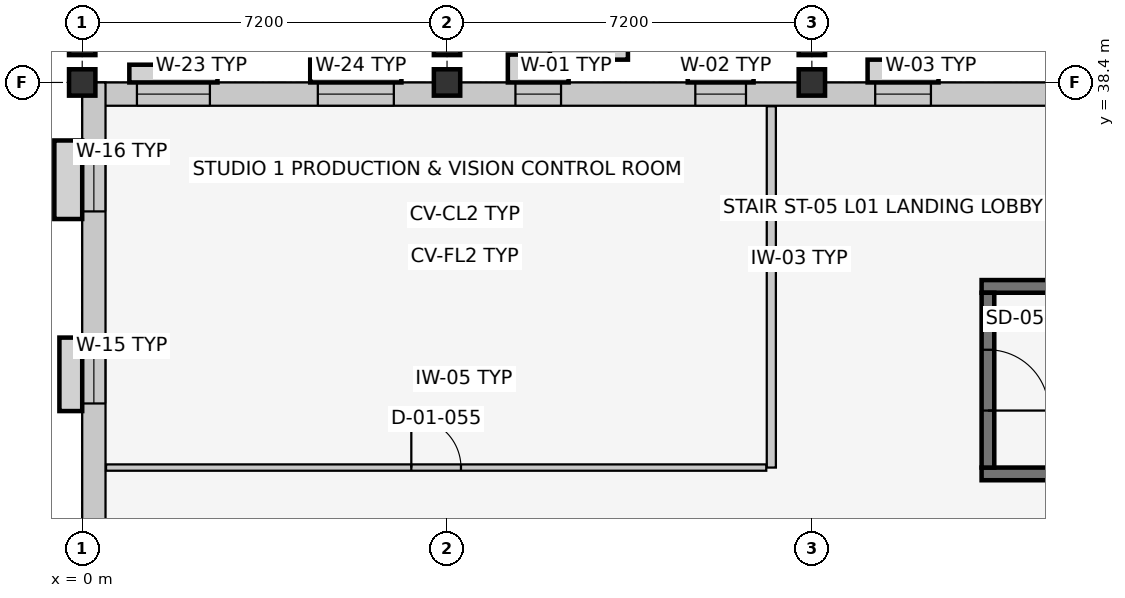
"""IFC4 building model, lengths in metres.
Left out: names, types, materials, properties, quantities, classifications, styles, units other than length and angle.
Written with IfcOpenShell. Run it as: python <this file> out.ifc"""

import sys

from ifc_helpers import new_model, si_unit, direction, frame, frame_2d, origin, origin_2d, place, context, subcontext, project, spatial, rectangle, extrude, element, fill, save


model = new_model("IFC4")
c1 = context("Model", 3, precision=1e-05, world=origin(), true_north=direction((0.0, 1.0)))
c2 = subcontext(c1, "Body", "Model", "MODEL_VIEW")
j1 = project(units=[si_unit("LENGTHUNIT", "METRE"), si_unit("PLANEANGLEUNIT", "RADIAN")], contexts=[c1])
p1 = place(None, origin())
s1 = spatial("IfcSite", under=j1, at=p1, CompositionType="ELEMENT")
p2 = place(p1, origin())
s2 = spatial("IfcBuilding", under=s1, at=p2, CompositionType="ELEMENT")
p3 = place(p2, frame((0.0, 0.0, 5.4)))
s3 = spatial("IfcBuildingStorey", under=s2, at=p3, CompositionType="ELEMENT", Elevation=5.4)
for number, where, z_axis, x_axis in (
    (1, (0.0, 38.4, 0.0), (0.0, 0.0, 1.0), (1.0, 0.0, 0.0)),
    (2, (7.2, 38.4, 0.0), (0.0, 0.0, 1.0), (1.0, 0.0, 0.0)),
    (3, (14.4, 38.4, 0.0), (0.0, 0.0, 1.0), (1.0, 0.0, 0.0)),
    (4, (0.0, 39.2, 0.0), (0.0, 0.0, 1.0), (1.0, 0.0, 0.0)),
    (5, (7.2, 39.2, 0.0), (0.0, 0.0, 1.0), (1.0, 0.0, 0.0)),
    (6, (14.4, 39.2, 0.0), (0.0, 0.0, 1.0), (1.0, 0.0, 0.0)),
):
    element("IfcColumn", number, at=place(p3, frame(where, z_axis=z_axis, x_axis=x_axis)), inside=s3, PredefinedType="COLUMN", context=c2, shape_type="SweptSolid", body=[
        extrude(rectangle(XDim=0.52, YDim=0.52, at=origin_2d()), origin(), (0.0, 0.0, 1.0), 4.2),
    ])
p4 = place(p3, frame((0.0, 38.17, 0.0), z_axis=(0.0, 0.0, 1.0), x_axis=(1.0, 0.0, 0.0)))
e7 = element("IfcWall", 7, at=p4, inside=s3, PredefinedType="SOLIDWALL", context=c2, shape_type="SweptSolid", body=[
    extrude(rectangle(XDim=57.6, YDim=0.46, at=frame_2d((28.8, 0.0))), origin(), (0.0, 0.0, 1.0), 3.215),
])
p5 = place(p4, frame((1.08, 0.0, 0.9)))
e8 = element("IfcOpeningElement", 8, at=p5, cuts=e7, PredefinedType="OPENING", context=c2, shape_type="SweptSolid", body=[
    extrude(rectangle(XDim=1.44, YDim=1.75, at=frame_2d((0.72, 0.875))), frame((0.0, 0.242, 0.0), z_axis=(0.0, -1.0, 0.0), x_axis=(1.0, 0.0, 0.0)), (0.0, 0.0, 1.0), 0.484),
])
p6 = place(p4, frame((4.65, 0.0, 0.9)))
e9 = element("IfcOpeningElement", 9, at=p6, cuts=e7, PredefinedType="OPENING", context=c2, shape_type="SweptSolid", body=[
    extrude(rectangle(XDim=1.5, YDim=1.75, at=frame_2d((0.75, 0.875))), frame((0.0, 0.242, 0.0), z_axis=(0.0, -1.0, 0.0), x_axis=(1.0, 0.0, 0.0)), (0.0, 0.0, 1.0), 0.484),
])
p7 = place(p4, frame((8.55, 0.0, 0.9)))
e10 = element("IfcOpeningElement", 10, at=p7, cuts=e7, PredefinedType="OPENING", context=c2, shape_type="SweptSolid", body=[
    extrude(rectangle(XDim=0.9, YDim=1.35, at=frame_2d((0.45, 0.675))), frame((0.0, 0.242, 0.0), z_axis=(0.0, -1.0, 0.0), x_axis=(1.0, 0.0, 0.0)), (0.0, 0.0, 1.0), 0.484),
])
p8 = place(p4, frame((12.1, 0.0, 0.9)))
e11 = element("IfcOpeningElement", 11, at=p8, cuts=e7, PredefinedType="OPENING", context=c2, shape_type="SweptSolid", body=[
    extrude(rectangle(XDim=1.0, YDim=1.35, at=frame_2d((0.5, 0.675))), frame((0.0, 0.242, 0.0), z_axis=(0.0, -1.0, 0.0), x_axis=(1.0, 0.0, 0.0)), (0.0, 0.0, 1.0), 0.484),
])
p9 = place(p4, frame((15.65, 0.0, 0.9)))
e12 = element("IfcOpeningElement", 12, at=p9, cuts=e7, PredefinedType="OPENING", context=c2, shape_type="SweptSolid", body=[
    extrude(rectangle(XDim=1.1, YDim=1.35, at=frame_2d((0.55, 0.675))), frame((0.0, 0.242, 0.0), z_axis=(0.0, -1.0, 0.0), x_axis=(1.0, 0.0, 0.0)), (0.0, 0.0, 1.0), 0.484),
])
p10 = place(p4, frame((19.2, 0.0, 0.9)))
e13 = element("IfcOpeningElement", 13, at=p10, cuts=e7, PredefinedType="OPENING", context=c2, shape_type="SweptSolid", body=[
    extrude(rectangle(XDim=1.2, YDim=1.35, at=frame_2d((0.6, 0.675))), frame((0.0, 0.242, 0.0), z_axis=(0.0, -1.0, 0.0), x_axis=(1.0, 0.0, 0.0)), (0.0, 0.0, 1.0), 0.484),
])
p11 = place(p4, frame((22.75, 0.0, 0.9)))
e14 = element("IfcOpeningElement", 14, at=p11, cuts=e7, PredefinedType="OPENING", context=c2, shape_type="SweptSolid", body=[
    extrude(rectangle(XDim=1.3, YDim=1.35, at=frame_2d((0.65, 0.675))), frame((0.0, 0.242, 0.0), z_axis=(0.0, -1.0, 0.0), x_axis=(1.0, 0.0, 0.0)), (0.0, 0.0, 1.0), 0.484),
])
p12 = place(p4, frame((30.125, 0.0, 0.9)))
e15 = element("IfcOpeningElement", 15, at=p12, cuts=e7, PredefinedType="OPENING", context=c2, shape_type="SweptSolid", body=[
    extrude(rectangle(XDim=0.95, YDim=1.45, at=frame_2d((0.475, 0.725))), frame((0.0, 0.242, 0.0), z_axis=(0.0, -1.0, 0.0), x_axis=(1.0, 0.0, 0.0)), (0.0, 0.0, 1.0), 0.484),
])
p13 = place(p4, frame((33.675, 0.0, 0.9)))
e16 = element("IfcOpeningElement", 16, at=p13, cuts=e7, PredefinedType="OPENING", context=c2, shape_type="SweptSolid", body=[
    extrude(rectangle(XDim=1.05, YDim=1.45, at=frame_2d((0.525, 0.725))), frame((0.0, 0.242, 0.0), z_axis=(0.0, -1.0, 0.0), x_axis=(1.0, 0.0, 0.0)), (0.0, 0.0, 1.0), 0.484),
])
p14 = place(p4, frame((40.775, 0.0, 0.9)))
e17 = element("IfcOpeningElement", 17, at=p14, cuts=e7, PredefinedType="OPENING", context=c2, shape_type="SweptSolid", body=[
    extrude(rectangle(XDim=1.25, YDim=1.45, at=frame_2d((0.625, 0.725))), frame((0.0, 0.242, 0.0), z_axis=(0.0, -1.0, 0.0), x_axis=(1.0, 0.0, 0.0)), (0.0, 0.0, 1.0), 0.484),
])
p15 = place(p4, frame((44.325, 0.0, 0.9)))
e18 = element("IfcOpeningElement", 18, at=p15, cuts=e7, PredefinedType="OPENING", context=c2, shape_type="SweptSolid", body=[
    extrude(rectangle(XDim=1.35, YDim=1.45, at=frame_2d((0.675, 0.725))), frame((0.0, 0.242, 0.0), z_axis=(0.0, -1.0, 0.0), x_axis=(1.0, 0.0, 0.0)), (0.0, 0.0, 1.0), 0.484),
])
p16 = place(p4, frame((51.75, 0.0, 0.9)))
e19 = element("IfcOpeningElement", 19, at=p16, cuts=e7, PredefinedType="OPENING", context=c2, shape_type="SweptSolid", body=[
    extrude(rectangle(XDim=0.9, YDim=1.6, at=frame_2d((0.45, 0.8))), frame((0.0, 0.242, 0.0), z_axis=(0.0, -1.0, 0.0), x_axis=(1.0, 0.0, 0.0)), (0.0, 0.0, 1.0), 0.484),
])
p17 = place(p4, frame((55.275, 0.0, 0.9)))
e20 = element("IfcOpeningElement", 20, at=p17, cuts=e7, PredefinedType="OPENING", context=c2, shape_type="SweptSolid", body=[
    extrude(rectangle(XDim=1.05, YDim=1.6, at=frame_2d((0.525, 0.8))), frame((0.0, 0.242, 0.0), z_axis=(0.0, -1.0, 0.0), x_axis=(1.0, 0.0, 0.0)), (0.0, 0.0, 1.0), 0.484),
])
p18 = place(p3, frame((0.23, 0.0, 0.0), z_axis=(0.0, 0.0, 1.0), x_axis=(0.0, 1.0, 0.0)))
e21 = element("IfcWall", 21, at=p18, inside=s3, PredefinedType="SOLIDWALL", context=c2, shape_type="SweptSolid", body=[
    extrude(rectangle(XDim=38.4, YDim=0.46, at=frame_2d((19.2, 0.0))), origin(), (0.0, 0.0, 1.0), 3.075),
])
p19 = place(p18, frame((32.065, 0.0, 0.9)))
e22 = element("IfcOpeningElement", 22, at=p19, cuts=e21, PredefinedType="OPENING", context=c2, shape_type="SweptSolid", body=[
    extrude(rectangle(XDim=1.15, YDim=1.6, at=frame_2d((0.575, 0.8))), frame((0.0, 0.242, 0.0), z_axis=(0.0, -1.0, 0.0), x_axis=(1.0, 0.0, 0.0)), (0.0, 0.0, 1.0), 0.484),
])
p20 = place(p18, frame((35.855, 0.0, 0.9)))
e23 = element("IfcOpeningElement", 23, at=p20, cuts=e21, PredefinedType="OPENING", context=c2, shape_type="SweptSolid", body=[
    extrude(rectangle(XDim=1.25, YDim=1.6, at=frame_2d((0.625, 0.8))), frame((0.0, 0.242, 0.0), z_axis=(0.0, -1.0, 0.0), x_axis=(1.0, 0.0, 0.0)), (0.0, 0.0, 1.0), 0.484),
])
for number, where, z_axis, x_axis in (
    (24, (17.75, 30.675, 0.0), (0.0, 0.0, 1.0), (1.0, 0.0, 0.0)),
    (25, (26.65, 34.375, 0.0), (0.0, 0.0, 1.0), (-1.0, 0.0, 0.0)),
):
    element("IfcWall", number, at=place(p3, frame(where, z_axis=z_axis, x_axis=x_axis)), inside=s3, PredefinedType="SHEAR", context=c2, shape_type="SweptSolid", body=[
        extrude(rectangle(XDim=8.9, YDim=0.25, at=frame_2d((4.45, 0.0))), origin(), (0.0, 0.0, 1.0), 3.92),
    ])
p21 = place(p3, frame((17.875, 34.25, 0.0), z_axis=(0.0, 0.0, 1.0), x_axis=(0.0, -1.0, 0.0)))
e26 = element("IfcWall", 26, at=p21, inside=s3, PredefinedType="SHEAR", context=c2, shape_type="SweptSolid", body=[
    extrude(rectangle(XDim=3.45, YDim=0.25, at=frame_2d((1.725, 0.0))), origin(), (0.0, 0.0, 1.0), 3.92),
])
p22 = place(p21, frame((1.125, 0.0, 0.0)))
e27 = element("IfcOpeningElement", 27, at=p22, cuts=e26, PredefinedType="OPENING", context=c2, shape_type="SweptSolid", body=[
    extrude(rectangle(XDim=1.2, YDim=2.15, at=frame_2d((0.6, 1.075))), frame((0.0, 0.137, 0.0), z_axis=(0.0, -1.0, 0.0), x_axis=(1.0, 0.0, 0.0)), (0.0, 0.0, 1.0), 0.274),
])
p23 = place(p3, frame((13.6, 30.8, 0.0), z_axis=(0.0, 0.0, 1.0), x_axis=(0.0, 1.0, 0.0)))
e28 = element("IfcWall", 28, at=p23, inside=s3, PredefinedType="PARTITIONING", context=c2, shape_type="SweptSolid", body=[
    extrude(rectangle(XDim=7.13, YDim=0.18, at=frame_2d((3.565, 0.0))), origin(), (0.0, 0.0, 1.0), 3.92),
])
p24 = place(p3, frame((0.47, 30.8, 0.0), z_axis=(0.0, 0.0, 1.0), x_axis=(1.0, 0.0, 0.0)))
e29 = element("IfcWall", 29, at=p24, inside=s3, PredefinedType="PARTITIONING", context=c2, shape_type="SweptSolid", body=[
    extrude(rectangle(XDim=13.03, YDim=0.125, at=frame_2d((6.515, 0.0))), origin(), (0.0, 0.0, 1.0), 3.92),
])
p25 = place(p24, frame((6.025, 0.0, 0.0)))
e30 = element("IfcOpeningElement", 30, at=p25, cuts=e29, PredefinedType="OPENING", context=c2, shape_type="SweptSolid", body=[
    extrude(rectangle(XDim=0.98, YDim=2.12, at=frame_2d((0.49, 1.06))), frame((0.0, 0.074, 0.0), z_axis=(0.0, -1.0, 0.0), x_axis=(1.0, 0.0, 0.0)), (0.0, 0.0, 1.0), 0.149),
])
p26 = place(p5, origin())
e31 = element("IfcWindow", 31, at=p26, inside=s3, PartitioningType="SINGLE_PANEL", PredefinedType="WINDOW", context=c2, shape_type="SweptSolid", body=[
    extrude(rectangle(XDim=1.44, YDim=1.75, at=frame_2d((0.72, 0.875))), frame((0.0, 0.03, 0.0), z_axis=(0.0, -1.0, 0.0), x_axis=(1.0, 0.0, 0.0)), (0.0, 0.0, 1.0), 0.06),
])
fill(e8, e31)
p27 = place(p6, origin())
e32 = element("IfcWindow", 32, at=p27, inside=s3, PartitioningType="SINGLE_PANEL", PredefinedType="WINDOW", context=c2, shape_type="SweptSolid", body=[
    extrude(rectangle(XDim=1.5, YDim=1.75, at=frame_2d((0.75, 0.875))), frame((0.0, 0.03, 0.0), z_axis=(0.0, -1.0, 0.0), x_axis=(1.0, 0.0, 0.0)), (0.0, 0.0, 1.0), 0.06),
])
fill(e9, e32)
p28 = place(p7, origin())
e33 = element("IfcWindow", 33, at=p28, inside=s3, PartitioningType="SINGLE_PANEL", PredefinedType="WINDOW", context=c2, shape_type="SweptSolid", body=[
    extrude(rectangle(XDim=0.9, YDim=1.35, at=frame_2d((0.45, 0.675))), frame((0.0, 0.03, 0.0), z_axis=(0.0, -1.0, 0.0), x_axis=(1.0, 0.0, 0.0)), (0.0, 0.0, 1.0), 0.06),
])
fill(e10, e33)
p29 = place(p8, origin())
e34 = element("IfcWindow", 34, at=p29, inside=s3, PartitioningType="SINGLE_PANEL", PredefinedType="WINDOW", context=c2, shape_type="SweptSolid", body=[
    extrude(rectangle(XDim=1.0, YDim=1.35, at=frame_2d((0.5, 0.675))), frame((0.0, 0.03, 0.0), z_axis=(0.0, -1.0, 0.0), x_axis=(1.0, 0.0, 0.0)), (0.0, 0.0, 1.0), 0.06),
])
fill(e11, e34)
p30 = place(p9, origin())
e35 = element("IfcWindow", 35, at=p30, inside=s3, PartitioningType="SINGLE_PANEL", PredefinedType="WINDOW", context=c2, shape_type="SweptSolid", body=[
    extrude(rectangle(XDim=1.1, YDim=1.35, at=frame_2d((0.55, 0.675))), frame((0.0, 0.03, 0.0), z_axis=(0.0, -1.0, 0.0), x_axis=(1.0, 0.0, 0.0)), (0.0, 0.0, 1.0), 0.06),
])
fill(e12, e35)
p31 = place(p19, origin())
e36 = element("IfcWindow", 36, at=p31, inside=s3, PartitioningType="SINGLE_PANEL", PredefinedType="WINDOW", context=c2, shape_type="SweptSolid", body=[
    extrude(rectangle(XDim=1.15, YDim=1.6, at=frame_2d((0.575, 0.8))), frame((0.0, 0.03, 0.0), z_axis=(0.0, -1.0, 0.0), x_axis=(1.0, 0.0, 0.0)), (0.0, 0.0, 1.0), 0.06),
])
fill(e22, e36)
p32 = place(p20, origin())
e37 = element("IfcWindow", 37, at=p32, inside=s3, PartitioningType="SINGLE_PANEL", PredefinedType="WINDOW", context=c2, shape_type="SweptSolid", body=[
    extrude(rectangle(XDim=1.25, YDim=1.6, at=frame_2d((0.625, 0.8))), frame((0.0, 0.03, 0.0), z_axis=(0.0, -1.0, 0.0), x_axis=(1.0, 0.0, 0.0)), (0.0, 0.0, 1.0), 0.06),
])
fill(e23, e37)
p33 = place(p22, origin())
e38 = element("IfcDoor", 38, at=p33, inside=s3, OperationType="SINGLE_SWING_RIGHT", PredefinedType="DOOR", context=c2, shape_type="SweptSolid", body=[
    extrude(rectangle(XDim=1.2, YDim=2.15, at=frame_2d((0.6, 1.075))), frame((0.0, 0.025, 0.0), z_axis=(0.0, -1.0, 0.0), x_axis=(1.0, 0.0, 0.0)), (0.0, 0.0, 1.0), 0.05),
])
fill(e27, e38)
p34 = place(p25, origin())
e39 = element("IfcDoor", 39, at=p34, inside=s3, OperationType="SINGLE_SWING_LEFT", PredefinedType="DOOR", context=c2, shape_type="SweptSolid", body=[
    extrude(rectangle(XDim=0.98, YDim=2.12, at=frame_2d((0.49, 1.06))), frame((0.0, 0.025, 0.0), z_axis=(0.0, -1.0, 0.0), x_axis=(1.0, 0.0, 0.0)), (0.0, 0.0, 1.0), 0.05),
])
fill(e30, e39)
save(model, sys.argv[1])
